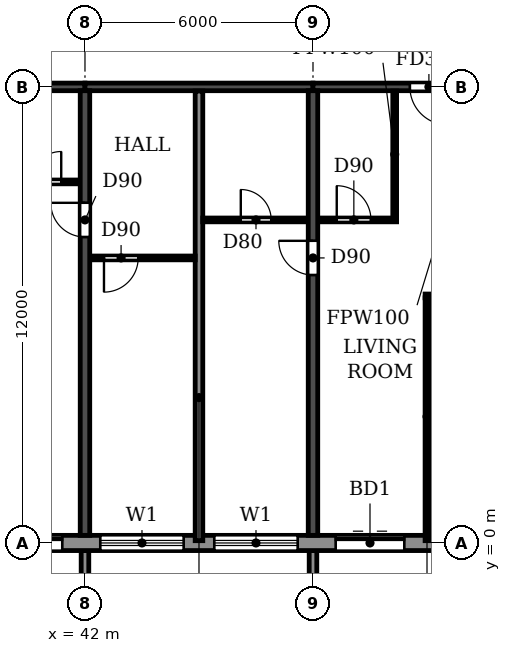
"""IFC4 building model, lengths in metres.
Left out: names, types, materials, properties, quantities, classifications, styles, units other than length and angle.
Written with IfcOpenShell. Run it as: python <this file> out.ifc"""

import sys

from ifc_helpers import new_model, si_unit, direction, frame, frame_2d, origin, place, context, subcontext, project, spatial, polyline, rectangle, outline, extrude, source, transform, mapped, element, fill, save


model = new_model("IFC4")
c1 = context("Model", 3, precision=1e-05, world=origin(), true_north=direction((0.0, 1.0)))
c2 = subcontext(c1, "Body", "Model", "MODEL_VIEW")
j1 = project(units=[si_unit("LENGTHUNIT", "METRE"), si_unit("PLANEANGLEUNIT", "RADIAN")], contexts=[c1])
p1 = place(None, origin())
s1 = spatial("IfcSite", under=j1, at=p1, CompositionType="ELEMENT")
p2 = place(p1, origin())
s2 = spatial("IfcBuilding", under=s1, at=p2, CompositionType="ELEMENT")
p3 = place(p2, frame((0.0, 0.0, 175.2)))
s3 = spatial("IfcBuildingStorey", under=s2, at=p3, CompositionType="ELEMENT", Elevation=175.2)
p4 = place(p3, frame((42.0, 0.2, 0.0), z_axis=(0.0, 0.0, 1.0), x_axis=(0.0, 1.0, 0.0)))
e1 = element("IfcWall", 1, at=p4, inside=s3, PredefinedType="SHEAR", context=c2, shape_type="SweptSolid", body=[
    extrude(rectangle(XDim=11.7, YDim=0.25, at=frame_2d((5.85, 0.0))), origin(), (0.0, 0.0, 1.0), 3.08),
])
p5 = place(p4, frame((7.85, 0.0, 0.0)))
e2 = element("IfcOpeningElement", 2, at=p5, cuts=e1, PredefinedType="OPENING", context=c2, shape_type="SweptSolid", body=[
    extrude(rectangle(XDim=0.9, YDim=2.1, at=frame_2d((0.45, 1.05))), frame((0.0, 0.135, 0.0), z_axis=(0.0, -1.0, 0.0), x_axis=(1.0, 0.0, 0.0)), (0.0, 0.0, 1.0), 0.27),
])
p6 = place(p3, frame((48.0, 0.2, 0.0), z_axis=(0.0, 0.0, 1.0), x_axis=(0.0, 1.0, 0.0)))
e3 = element("IfcWall", 3, at=p6, inside=s3, PredefinedType="SHEAR", context=c2, shape_type="SweptSolid", body=[
    extrude(rectangle(XDim=11.7, YDim=0.25, at=frame_2d((5.85, 0.0))), origin(), (0.0, 0.0, 1.0), 3.08),
])
p7 = place(p6, frame((6.85, 0.0, 0.0)))
e4 = element("IfcOpeningElement", 4, at=p7, cuts=e3, PredefinedType="OPENING", context=c2, shape_type="SweptSolid", body=[
    extrude(rectangle(XDim=0.9, YDim=2.1, at=frame_2d((0.45, 1.05))), frame((0.0, 0.135, 0.0), z_axis=(0.0, -1.0, 0.0), x_axis=(1.0, 0.0, 0.0)), (0.0, 0.0, 1.0), 0.27),
])
p8 = place(p3, frame((36.0, 12.0, 0.0), z_axis=(0.0, 0.0, 1.0), x_axis=(1.0, 0.0, 0.0)))
e5 = element("IfcWall", 5, at=p8, inside=s3, PredefinedType="SHEAR", context=c2, shape_type="SweptSolid", body=[
    extrude(rectangle(XDim=6.0, YDim=0.2, at=frame_2d((3.0, 0.0))), origin(), (0.0, 0.0, 1.0), 2.48),
])
p9 = place(p8, frame((2.55, 0.0, 0.0)))
e6 = element("IfcOpeningElement", 6, at=p9, cuts=e5, PredefinedType="OPENING", context=c2, shape_type="SweptSolid", body=[
    extrude(rectangle(XDim=1.0, YDim=2.1, at=frame_2d((0.5, 1.05))), frame((0.0, 0.11, 0.0), z_axis=(0.0, -1.0, 0.0), x_axis=(1.0, 0.0, 0.0)), (0.0, 0.0, 1.0), 0.22),
])
p10 = place(p3, frame((42.0, 12.0, 0.0), z_axis=(0.0, 0.0, 1.0), x_axis=(1.0, 0.0, 0.0)))
e7 = element("IfcWall", 7, at=p10, inside=s3, PredefinedType="SHEAR", context=c2, shape_type="SweptSolid", body=[
    extrude(rectangle(XDim=6.0, YDim=0.2, at=frame_2d((3.0, 0.0))), origin(), (0.0, 0.0, 1.0), 2.48),
])
p11 = place(p3, frame((48.0, 12.0, 0.0), z_axis=(0.0, 0.0, 1.0), x_axis=(1.0, 0.0, 0.0)))
e8 = element("IfcWall", 8, at=p11, inside=s3, PredefinedType="SHEAR", context=c2, shape_type="SweptSolid", body=[
    extrude(rectangle(XDim=6.0, YDim=0.2, at=frame_2d((3.0, 0.0))), origin(), (0.0, 0.0, 1.0), 2.48),
])
p12 = place(p11, frame((2.55, 0.0, 0.0)))
e9 = element("IfcOpeningElement", 9, at=p12, cuts=e8, PredefinedType="OPENING", context=c2, shape_type="SweptSolid", body=[
    extrude(rectangle(XDim=1.0, YDim=2.1, at=frame_2d((0.5, 1.05))), frame((0.0, 0.11, 0.0), z_axis=(0.0, -1.0, 0.0), x_axis=(1.0, 0.0, 0.0)), (0.0, 0.0, 1.0), 0.22),
])
p13 = place(p3, frame((22.683, 0.0, 0.0), z_axis=(0.0, 0.0, 1.0), x_axis=(1.0, 0.0, 0.0)))
e10 = element("IfcWall", 10, at=p13, inside=s3, PredefinedType="STANDARD", context=c2, shape_type="SweptSolid", body=[
    extrude(rectangle(XDim=56.634, YDim=0.4, at=frame_2d((28.317, 0.0))), origin(), (0.0, 0.0, 1.0), 3.08),
])
p14 = place(p13, frame((1.717, 0.0, 0.9)))
e11 = element("IfcOpeningElement", 11, at=p14, cuts=e10, PredefinedType="OPENING", context=c2, shape_type="SweptSolid", body=[
    extrude(rectangle(XDim=2.2, YDim=1.5, at=frame_2d((1.1, 0.75))), frame((0.0, 0.21, 0.0), z_axis=(0.0, -1.0, 0.0), x_axis=(1.0, 0.0, 0.0)), (0.0, 0.0, 1.0), 0.42),
])
p15 = place(p13, frame((4.917, 0.0, 0.0)))
e12 = element("IfcOpeningElement", 12, at=p15, cuts=e10, PredefinedType="OPENING", context=c2, shape_type="SweptSolid", body=[
    extrude(rectangle(XDim=1.8, YDim=2.4, at=frame_2d((0.9, 1.2))), frame((0.0, 0.21, 0.0), z_axis=(0.0, -1.0, 0.0), x_axis=(1.0, 0.0, 0.0)), (0.0, 0.0, 1.0), 0.42),
])
p16 = place(p13, frame((7.717, 0.0, 0.9)))
e13 = element("IfcOpeningElement", 13, at=p16, cuts=e10, PredefinedType="OPENING", context=c2, shape_type="SweptSolid", body=[
    extrude(rectangle(XDim=2.2, YDim=1.5, at=frame_2d((1.1, 0.75))), frame((0.0, 0.21, 0.0), z_axis=(0.0, -1.0, 0.0), x_axis=(1.0, 0.0, 0.0)), (0.0, 0.0, 1.0), 0.42),
])
p17 = place(p13, frame((10.717, 0.0, 0.9)))
e14 = element("IfcOpeningElement", 14, at=p17, cuts=e10, PredefinedType="OPENING", context=c2, shape_type="SweptSolid", body=[
    extrude(rectangle(XDim=2.2, YDim=1.5, at=frame_2d((1.1, 0.75))), frame((0.0, 0.21, 0.0), z_axis=(0.0, -1.0, 0.0), x_axis=(1.0, 0.0, 0.0)), (0.0, 0.0, 1.0), 0.42),
])
p18 = place(p13, frame((13.717, 0.0, 0.9)))
e15 = element("IfcOpeningElement", 15, at=p18, cuts=e10, PredefinedType="OPENING", context=c2, shape_type="SweptSolid", body=[
    extrude(rectangle(XDim=2.2, YDim=1.5, at=frame_2d((1.1, 0.75))), frame((0.0, 0.21, 0.0), z_axis=(0.0, -1.0, 0.0), x_axis=(1.0, 0.0, 0.0)), (0.0, 0.0, 1.0), 0.42),
])
p19 = place(p13, frame((16.917, 0.0, 0.0)))
e16 = element("IfcOpeningElement", 16, at=p19, cuts=e10, PredefinedType="OPENING", context=c2, shape_type="SweptSolid", body=[
    extrude(rectangle(XDim=1.8, YDim=2.4, at=frame_2d((0.9, 1.2))), frame((0.0, 0.21, 0.0), z_axis=(0.0, -1.0, 0.0), x_axis=(1.0, 0.0, 0.0)), (0.0, 0.0, 1.0), 0.42),
])
p20 = place(p13, frame((19.717, 0.0, 0.9)))
e17 = element("IfcOpeningElement", 17, at=p20, cuts=e10, PredefinedType="OPENING", context=c2, shape_type="SweptSolid", body=[
    extrude(rectangle(XDim=2.2, YDim=1.5, at=frame_2d((1.1, 0.75))), frame((0.0, 0.21, 0.0), z_axis=(0.0, -1.0, 0.0), x_axis=(1.0, 0.0, 0.0)), (0.0, 0.0, 1.0), 0.42),
])
p21 = place(p13, frame((22.717, 0.0, 0.9)))
e18 = element("IfcOpeningElement", 18, at=p21, cuts=e10, PredefinedType="OPENING", context=c2, shape_type="SweptSolid", body=[
    extrude(rectangle(XDim=2.2, YDim=1.5, at=frame_2d((1.1, 0.75))), frame((0.0, 0.21, 0.0), z_axis=(0.0, -1.0, 0.0), x_axis=(1.0, 0.0, 0.0)), (0.0, 0.0, 1.0), 0.42),
])
p22 = place(p13, frame((25.917, 0.0, 0.0)))
e19 = element("IfcOpeningElement", 19, at=p22, cuts=e10, PredefinedType="OPENING", context=c2, shape_type="SweptSolid", body=[
    extrude(rectangle(XDim=1.8, YDim=2.4, at=frame_2d((0.9, 1.2))), frame((0.0, 0.21, 0.0), z_axis=(0.0, -1.0, 0.0), x_axis=(1.0, 0.0, 0.0)), (0.0, 0.0, 1.0), 0.42),
])
p23 = place(p13, frame((28.717, 0.0, 0.9)))
e20 = element("IfcOpeningElement", 20, at=p23, cuts=e10, PredefinedType="OPENING", context=c2, shape_type="SweptSolid", body=[
    extrude(rectangle(XDim=2.2, YDim=1.5, at=frame_2d((1.1, 0.75))), frame((0.0, 0.21, 0.0), z_axis=(0.0, -1.0, 0.0), x_axis=(1.0, 0.0, 0.0)), (0.0, 0.0, 1.0), 0.42),
])
p24 = place(p13, frame((31.717, 0.0, 0.9)))
e21 = element("IfcOpeningElement", 21, at=p24, cuts=e10, PredefinedType="OPENING", context=c2, shape_type="SweptSolid", body=[
    extrude(rectangle(XDim=2.2, YDim=1.5, at=frame_2d((1.1, 0.75))), frame((0.0, 0.21, 0.0), z_axis=(0.0, -1.0, 0.0), x_axis=(1.0, 0.0, 0.0)), (0.0, 0.0, 1.0), 0.42),
])
p25 = place(p13, frame((34.717, 0.0, 0.9)))
e22 = element("IfcOpeningElement", 22, at=p25, cuts=e10, PredefinedType="OPENING", context=c2, shape_type="SweptSolid", body=[
    extrude(rectangle(XDim=2.2, YDim=1.5, at=frame_2d((1.1, 0.75))), frame((0.0, 0.21, 0.0), z_axis=(0.0, -1.0, 0.0), x_axis=(1.0, 0.0, 0.0)), (0.0, 0.0, 1.0), 0.42),
])
p26 = place(p13, frame((37.717, 0.0, 0.9)))
e23 = element("IfcOpeningElement", 23, at=p26, cuts=e10, PredefinedType="OPENING", context=c2, shape_type="SweptSolid", body=[
    extrude(rectangle(XDim=2.2, YDim=1.5, at=frame_2d((1.1, 0.75))), frame((0.0, 0.21, 0.0), z_axis=(0.0, -1.0, 0.0), x_axis=(1.0, 0.0, 0.0)), (0.0, 0.0, 1.0), 0.42),
])
p27 = place(p13, frame((40.917, 0.0, 0.0)))
e24 = element("IfcOpeningElement", 24, at=p27, cuts=e10, PredefinedType="OPENING", context=c2, shape_type="SweptSolid", body=[
    extrude(rectangle(XDim=1.8, YDim=2.4, at=frame_2d((0.9, 1.2))), frame((0.0, 0.21, 0.0), z_axis=(0.0, -1.0, 0.0), x_axis=(1.0, 0.0, 0.0)), (0.0, 0.0, 1.0), 0.42),
])
p28 = place(p13, frame((43.717, 0.0, 0.9)))
e25 = element("IfcOpeningElement", 25, at=p28, cuts=e10, PredefinedType="OPENING", context=c2, shape_type="SweptSolid", body=[
    extrude(rectangle(XDim=2.2, YDim=1.5, at=frame_2d((1.1, 0.75))), frame((0.0, 0.21, 0.0), z_axis=(0.0, -1.0, 0.0), x_axis=(1.0, 0.0, 0.0)), (0.0, 0.0, 1.0), 0.42),
])
p29 = place(p13, frame((46.717, 0.0, 0.9)))
e26 = element("IfcOpeningElement", 26, at=p29, cuts=e10, PredefinedType="OPENING", context=c2, shape_type="SweptSolid", body=[
    extrude(rectangle(XDim=2.2, YDim=1.5, at=frame_2d((1.1, 0.75))), frame((0.0, 0.21, 0.0), z_axis=(0.0, -1.0, 0.0), x_axis=(1.0, 0.0, 0.0)), (0.0, 0.0, 1.0), 0.42),
])
p30 = place(p13, frame((49.717, 0.0, 0.9)))
e27 = element("IfcOpeningElement", 27, at=p30, cuts=e10, PredefinedType="OPENING", context=c2, shape_type="SweptSolid", body=[
    extrude(rectangle(XDim=2.2, YDim=1.5, at=frame_2d((1.1, 0.75))), frame((0.0, 0.21, 0.0), z_axis=(0.0, -1.0, 0.0), x_axis=(1.0, 0.0, 0.0)), (0.0, 0.0, 1.0), 0.42),
])
p31 = place(p13, frame((52.917, 0.0, 0.0)))
e28 = element("IfcOpeningElement", 28, at=p31, cuts=e10, PredefinedType="OPENING", context=c2, shape_type="SweptSolid", body=[
    extrude(rectangle(XDim=1.8, YDim=2.4, at=frame_2d((0.9, 1.2))), frame((0.0, 0.21, 0.0), z_axis=(0.0, -1.0, 0.0), x_axis=(1.0, 0.0, 0.0)), (0.0, 0.0, 1.0), 0.42),
])
m1 = source(origin(), c2, "Body", "SweptSolid", [
    extrude(outline(polyline([(0.0, 0.0), (0.2, 0.0), (0.2, 1.65), (0.0, 1.65), (0.0, 0.0)])), origin(), (0.0, 0.0, 1.0), 3.1),
])
for number, where in (
    (29, (41.9, -1.85, 0.0)),
    (30, (47.9, -1.85, 0.0)),
):
    element("IfcWall", number, at=place(p3, frame(where)), inside=s3, PredefinedType="STANDARD", context=c2, shape_type="MappedRepresentation", body=[
        mapped(m1, transform((0.0, 0.0, 0.0))),
    ])
p32 = place(p3, frame((45.0, 0.06, 0.0), z_axis=(0.0, 0.0, 1.0), x_axis=(0.0, 1.0, 0.0)))
e31 = element("IfcWall", 31, at=p32, inside=s3, PredefinedType="PARTITIONING", context=c2, shape_type="SweptSolid", body=[
    extrude(rectangle(XDim=11.83, YDim=0.2, at=frame_2d((5.915, 0.0))), origin(), (0.0, 0.0, 1.0), 3.08),
])
p33 = place(p3, frame((50.95, 6.5, 0.0), z_axis=(0.0, 0.0, 1.0), x_axis=(1.0, 0.0, 0.0)))
e32 = element("IfcWall", 32, at=p33, inside=s3, PredefinedType="PARTITIONING", context=c2, shape_type="SweptSolid", body=[
    extrude(rectangle(XDim=2.915, YDim=0.1, at=frame_2d((1.458, 0.0))), origin(), (0.0, 0.0, 1.0), 3.08),
])
p34 = place(p33, frame((1.65, 0.0, 0.0)))
e33 = element("IfcOpeningElement", 33, at=p34, cuts=e32, PredefinedType="OPENING", context=c2, shape_type="SweptSolid", body=[
    extrude(rectangle(XDim=0.9, YDim=2.1, at=frame_2d((0.45, 1.05))), frame((0.0, 0.06, 0.0), z_axis=(0.0, -1.0, 0.0), x_axis=(1.0, 0.0, 0.0)), (0.0, 0.0, 1.0), 0.12),
])
p35 = place(p3, frame((42.135, 7.5, 0.0), z_axis=(0.0, 0.0, 1.0), x_axis=(1.0, 0.0, 0.0)))
e34 = element("IfcWall", 34, at=p35, inside=s3, PredefinedType="PARTITIONING", context=c2, shape_type="SweptSolid", body=[
    extrude(rectangle(XDim=2.765, YDim=0.1, at=frame_2d((1.382, 0.0))), origin(), (0.0, 0.0, 1.0), 3.08),
])
p36 = place(p35, frame((0.365, 0.0, 0.0)))
e35 = element("IfcOpeningElement", 35, at=p36, cuts=e34, PredefinedType="OPENING", context=c2, shape_type="SweptSolid", body=[
    extrude(rectangle(XDim=0.9, YDim=2.1, at=frame_2d((0.45, 1.05))), frame((0.0, 0.06, 0.0), z_axis=(0.0, -1.0, 0.0), x_axis=(1.0, 0.0, 0.0)), (0.0, 0.0, 1.0), 0.12),
])
p37 = place(p3, frame((45.1, 8.5, 0.0), z_axis=(0.0, 0.0, 1.0), x_axis=(1.0, 0.0, 0.0)))
e36 = element("IfcWall", 36, at=p37, inside=s3, PredefinedType="PARTITIONING", context=c2, shape_type="SweptSolid", body=[
    extrude(rectangle(XDim=2.765, YDim=0.1, at=frame_2d((1.382, 0.0))), origin(), (0.0, 0.0, 1.0), 3.08),
])
p38 = place(p37, frame((1.0, 0.0, 0.0)))
e37 = element("IfcOpeningElement", 37, at=p38, cuts=e36, PredefinedType="OPENING", context=c2, shape_type="SweptSolid", body=[
    extrude(rectangle(XDim=0.8, YDim=2.1, at=frame_2d((0.4, 1.05))), frame((0.0, 0.06, 0.0), z_axis=(0.0, -1.0, 0.0), x_axis=(1.0, 0.0, 0.0)), (0.0, 0.0, 1.0), 0.12),
])
p39 = place(p3, frame((48.135, 8.5, 0.0), z_axis=(0.0, 0.0, 1.0), x_axis=(1.0, 0.0, 0.0)))
e38 = element("IfcWall", 38, at=p39, inside=s3, PredefinedType="PARTITIONING", context=c2, shape_type="SweptSolid", body=[
    extrude(rectangle(XDim=2.065, YDim=0.1, at=frame_2d((1.032, 0.0))), origin(), (0.0, 0.0, 1.0), 3.08),
])
p40 = place(p39, frame((0.49, 0.0, 0.0)))
e39 = element("IfcOpeningElement", 39, at=p40, cuts=e38, PredefinedType="OPENING", context=c2, shape_type="SweptSolid", body=[
    extrude(rectangle(XDim=0.9, YDim=2.1, at=frame_2d((0.45, 1.05))), frame((0.0, 0.06, 0.0), z_axis=(0.0, -1.0, 0.0), x_axis=(1.0, 0.0, 0.0)), (0.0, 0.0, 1.0), 0.12),
])
p41 = place(p3, frame((39.9, 9.5, 0.0), z_axis=(0.0, 0.0, 1.0), x_axis=(1.0, 0.0, 0.0)))
e40 = element("IfcWall", 40, at=p41, inside=s3, PredefinedType="PARTITIONING", context=c2, shape_type="SweptSolid", body=[
    extrude(rectangle(XDim=1.965, YDim=0.1, at=frame_2d((0.982, 0.0))), origin(), (0.0, 0.0, 1.0), 3.08),
])
p42 = place(p41, frame((0.675, 0.0, 0.0)))
e41 = element("IfcOpeningElement", 41, at=p42, cuts=e40, PredefinedType="OPENING", context=c2, shape_type="SweptSolid", body=[
    extrude(rectangle(XDim=0.8, YDim=2.1, at=frame_2d((0.4, 1.05))), frame((0.0, 0.06, 0.0), z_axis=(0.0, -1.0, 0.0), x_axis=(1.0, 0.0, 0.0)), (0.0, 0.0, 1.0), 0.12),
])
p43 = place(p3, frame((50.15, 8.55, 0.0), z_axis=(0.0, 0.0, 1.0), x_axis=(0.0, 1.0, 0.0)))
e42 = element("IfcWall", 42, at=p43, inside=s3, PredefinedType="PARTITIONING", context=c2, shape_type="SweptSolid", body=[
    extrude(rectangle(XDim=3.34, YDim=0.1, at=frame_2d((1.67, 0.0))), origin(), (0.0, 0.0, 1.0), 3.08),
])
p44 = place(p3, frame((51.0, 0.06, 0.0), z_axis=(0.0, 0.0, 1.0), x_axis=(0.0, 1.0, 0.0)))
e43 = element("IfcWall", 43, at=p44, inside=s3, PredefinedType="PARTITIONING", context=c2, shape_type="SweptSolid", body=[
    extrude(rectangle(XDim=6.39, YDim=0.1, at=frame_2d((3.195, 0.0))), origin(), (0.0, 0.0, 1.0), 3.08),
])
p45 = place(p19, origin())
e44 = element("IfcDoor", 44, at=p45, inside=s3, OperationType="DOUBLE_DOOR_SLIDING", PredefinedType="DOOR", context=c2, shape_type="SweptSolid", body=[
    extrude(rectangle(XDim=1.8, YDim=2.4, at=frame_2d((0.9, 1.2))), frame((0.0, 0.025, 0.0), z_axis=(0.0, -1.0, 0.0), x_axis=(1.0, 0.0, 0.0)), (0.0, 0.0, 1.0), 0.05),
])
fill(e16, e44)
p46 = place(p20, origin())
e45 = element("IfcWindow", 45, at=p46, inside=s3, PartitioningType="DOUBLE_PANEL_HORIZONTAL", PredefinedType="WINDOW", context=c2, shape_type="SweptSolid", body=[
    extrude(rectangle(XDim=2.2, YDim=1.5, at=frame_2d((1.1, 0.75))), frame((0.0, 0.03, 0.0), z_axis=(0.0, -1.0, 0.0), x_axis=(1.0, 0.0, 0.0)), (0.0, 0.0, 1.0), 0.06),
])
fill(e17, e45)
p47 = place(p21, origin())
e46 = element("IfcWindow", 46, at=p47, inside=s3, PartitioningType="DOUBLE_PANEL_HORIZONTAL", PredefinedType="WINDOW", context=c2, shape_type="SweptSolid", body=[
    extrude(rectangle(XDim=2.2, YDim=1.5, at=frame_2d((1.1, 0.75))), frame((0.0, 0.03, 0.0), z_axis=(0.0, -1.0, 0.0), x_axis=(1.0, 0.0, 0.0)), (0.0, 0.0, 1.0), 0.06),
])
fill(e18, e46)
p48 = place(p22, origin())
e47 = element("IfcDoor", 47, at=p48, inside=s3, OperationType="DOUBLE_DOOR_SLIDING", PredefinedType="DOOR", context=c2, shape_type="SweptSolid", body=[
    extrude(rectangle(XDim=1.8, YDim=2.4, at=frame_2d((0.9, 1.2))), frame((0.0, 0.025, 0.0), z_axis=(0.0, -1.0, 0.0), x_axis=(1.0, 0.0, 0.0)), (0.0, 0.0, 1.0), 0.05),
])
fill(e19, e47)
p49 = place(p36, frame((0.9, 0.0, 0.0), z_axis=(0.0, 0.0, 1.0), x_axis=(-1.0, 0.0, 0.0)))
e48 = element("IfcDoor", 48, at=p49, inside=s3, OperationType="SINGLE_SWING_RIGHT", PredefinedType="DOOR", context=c2, shape_type="SweptSolid", body=[
    extrude(rectangle(XDim=0.9, YDim=2.1, at=frame_2d((0.45, 1.05))), frame((0.0, 0.025, 0.0), z_axis=(0.0, -1.0, 0.0), x_axis=(1.0, 0.0, 0.0)), (0.0, 0.0, 1.0), 0.05),
])
fill(e35, e48)
p50 = place(p42, origin())
e49 = element("IfcDoor", 49, at=p50, inside=s3, OperationType="SINGLE_SWING_RIGHT", PredefinedType="DOOR", context=c2, shape_type="SweptSolid", body=[
    extrude(rectangle(XDim=0.8, YDim=2.1, at=frame_2d((0.4, 1.05))), frame((0.0, 0.025, 0.0), z_axis=(0.0, -1.0, 0.0), x_axis=(1.0, 0.0, 0.0)), (0.0, 0.0, 1.0), 0.05),
])
fill(e41, e49)
p51 = place(p5, origin())
e50 = element("IfcDoor", 50, at=p51, inside=s3, OperationType="SINGLE_SWING_RIGHT", PredefinedType="DOOR", context=c2, shape_type="SweptSolid", body=[
    extrude(rectangle(XDim=0.9, YDim=2.1, at=frame_2d((0.45, 1.05))), frame((0.0, 0.025, 0.0), z_axis=(0.0, -1.0, 0.0), x_axis=(1.0, 0.0, 0.0)), (0.0, 0.0, 1.0), 0.05),
])
fill(e2, e50)
p52 = place(p38, origin())
e51 = element("IfcDoor", 51, at=p52, inside=s3, OperationType="SINGLE_SWING_LEFT", PredefinedType="DOOR", context=c2, shape_type="SweptSolid", body=[
    extrude(rectangle(XDim=0.8, YDim=2.1, at=frame_2d((0.4, 1.05))), frame((0.0, 0.025, 0.0), z_axis=(0.0, -1.0, 0.0), x_axis=(1.0, 0.0, 0.0)), (0.0, 0.0, 1.0), 0.05),
])
fill(e37, e51)
p53 = place(p7, origin())
e52 = element("IfcDoor", 52, at=p53, inside=s3, OperationType="SINGLE_SWING_RIGHT", PredefinedType="DOOR", context=c2, shape_type="SweptSolid", body=[
    extrude(rectangle(XDim=0.9, YDim=2.1, at=frame_2d((0.45, 1.05))), frame((0.0, 0.025, 0.0), z_axis=(0.0, -1.0, 0.0), x_axis=(1.0, 0.0, 0.0)), (0.0, 0.0, 1.0), 0.05),
])
fill(e4, e52)
p54 = place(p40, origin())
e53 = element("IfcDoor", 53, at=p54, inside=s3, OperationType="SINGLE_SWING_LEFT", PredefinedType="DOOR", context=c2, shape_type="SweptSolid", body=[
    extrude(rectangle(XDim=0.9, YDim=2.1, at=frame_2d((0.45, 1.05))), frame((0.0, 0.025, 0.0), z_axis=(0.0, -1.0, 0.0), x_axis=(1.0, 0.0, 0.0)), (0.0, 0.0, 1.0), 0.05),
])
fill(e39, e53)
p55 = place(p12, frame((1.0, 0.0, 0.0), z_axis=(0.0, 0.0, 1.0), x_axis=(-1.0, 0.0, 0.0)))
e54 = element("IfcDoor", 54, at=p55, inside=s3, OperationType="SINGLE_SWING_LEFT", PredefinedType="DOOR", context=c2, shape_type="SweptSolid", body=[
    extrude(rectangle(XDim=1.0, YDim=2.1, at=frame_2d((0.5, 1.05))), frame((0.0, 0.025, 0.0), z_axis=(0.0, -1.0, 0.0), x_axis=(1.0, 0.0, 0.0)), (0.0, 0.0, 1.0), 0.05),
])
fill(e9, e54)
save(model, sys.argv[1])
